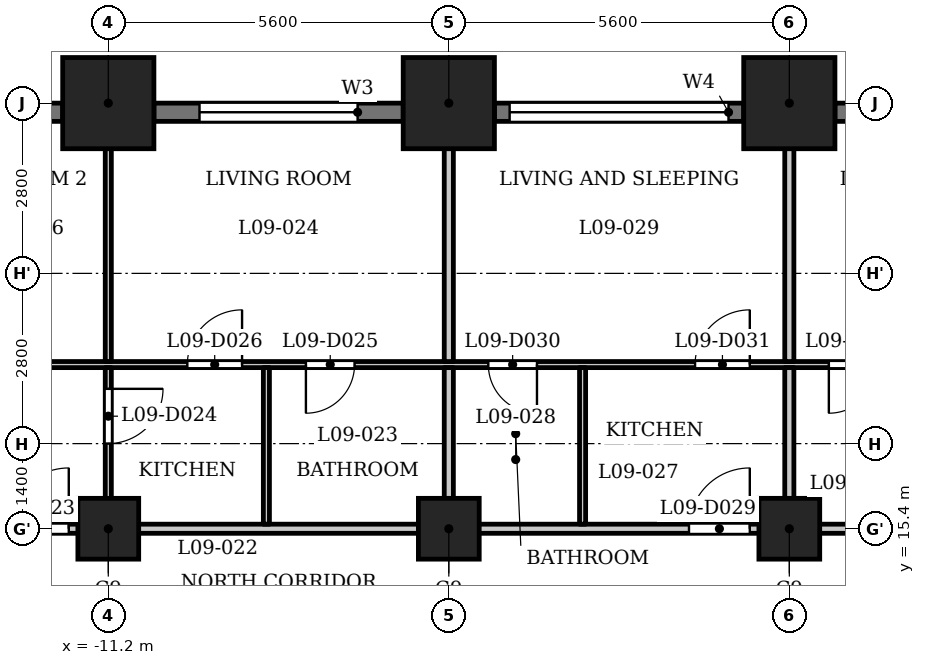
"""IFC4 building model, lengths in metres.
Left out: names, types, materials, properties, quantities, classifications, styles, units other than length and angle.
Written with IfcOpenShell. Run it as: python <this file> out.ifc"""

import sys

from ifc_helpers import new_model, si_unit, direction, frame, frame_2d, origin, origin_2d, place, context, subcontext, project, spatial, rectangle, extrude, element, fill, save


model = new_model("IFC4")
c1 = context("Model", 3, precision=1e-05, world=origin(), true_north=direction((0.0, 1.0)))
c2 = subcontext(c1, "Body", "Model", "MODEL_VIEW")
j1 = project(units=[si_unit("LENGTHUNIT", "METRE"), si_unit("PLANEANGLEUNIT", "RADIAN")], contexts=[c1])
p1 = place(None, origin())
s1 = spatial("IfcSite", under=j1, at=p1, CompositionType="ELEMENT")
p2 = place(p1, origin())
s2 = spatial("IfcBuilding", under=s1, at=p2, CompositionType="ELEMENT")
p3 = place(p2, frame((0.0, 0.0, 41.0)))
s3 = spatial("IfcBuildingStorey", under=s2, at=p3, CompositionType="ELEMENT", Elevation=41.0)
for number, where, z_axis, x_axis in (
    (1, (0.0, 22.4, 0.0), (0.0, 0.0, 1.0), (1.0, 0.0, 0.0)),
    (2, (-5.6, 22.4, 0.0), (0.0, 0.0, 1.0), (1.0, 0.0, 0.0)),
    (3, (-11.2, 22.4, 0.0), (0.0, 0.0, 1.0), (1.0, 0.0, 0.0)),
):
    element("IfcColumn", number, at=place(p3, frame(where, z_axis=z_axis, x_axis=x_axis)), inside=s3, PredefinedType="COLUMN", context=c2, shape_type="SweptSolid", body=[
        extrude(rectangle(XDim=1.5, YDim=1.5, at=origin_2d()), origin(), (0.0, 0.0, 1.0), 3.5),
    ])
for number, where, z_axis, x_axis in (
    (4, (-11.2, 15.4, 0.0), (0.0, 0.0, 1.0), (1.0, 0.0, 0.0)),
    (5, (-5.6, 15.4, 0.0), (0.0, 0.0, 1.0), (1.0, 0.0, 0.0)),
    (6, (0.0, 15.4, 0.0), (0.0, 0.0, 1.0), (1.0, 0.0, 0.0)),
):
    element("IfcColumn", number, at=place(p3, frame(where, z_axis=z_axis, x_axis=x_axis)), inside=s3, PredefinedType="COLUMN", context=c2, shape_type="SweptSolid", body=[
        extrude(rectangle(XDim=1.0, YDim=1.0, at=origin_2d()), origin(), (0.0, 0.0, 1.0), 3.5),
    ])
p4 = place(p3, frame((4.85, 22.25, 0.0), z_axis=(0.0, 0.0, 1.0), x_axis=(-1.0, 0.0, 0.0)))
e7 = element("IfcWall", 7, at=p4, inside=s3, PredefinedType="SOLIDWALL", context=c2, shape_type="SweptSolid", body=[
    extrude(rectangle(XDim=4.1, YDim=0.3, at=frame_2d((2.05, 0.0))), origin(), (0.0, 0.0, 1.0), 2.35),
])
p5 = place(p4, frame((0.25, 0.0, 1.2)))
e8 = element("IfcOpeningElement", 8, at=p5, cuts=e7, PredefinedType="OPENING", context=c2, shape_type="SweptSolid", body=[
    extrude(rectangle(XDim=3.6, YDim=0.95, at=frame_2d((1.8, 0.475))), frame((0.0, 0.16, 0.0), z_axis=(0.0, -1.0, 0.0), x_axis=(1.0, 0.0, 0.0)), (0.0, 0.0, 1.0), 0.32),
])
p6 = place(p3, frame((-0.75, 22.25, 0.0), z_axis=(0.0, 0.0, 1.0), x_axis=(-1.0, 0.0, 0.0)))
e9 = element("IfcWall", 9, at=p6, inside=s3, PredefinedType="SOLIDWALL", context=c2, shape_type="SweptSolid", body=[
    extrude(rectangle(XDim=4.1, YDim=0.3, at=frame_2d((2.05, 0.0))), origin(), (0.0, 0.0, 1.0), 2.35),
])
p7 = place(p6, frame((0.25, 0.0, 1.2)))
e10 = element("IfcOpeningElement", 10, at=p7, cuts=e9, PredefinedType="OPENING", context=c2, shape_type="SweptSolid", body=[
    extrude(rectangle(XDim=3.6, YDim=0.95, at=frame_2d((1.8, 0.475))), frame((0.0, 0.16, 0.0), z_axis=(0.0, -1.0, 0.0), x_axis=(1.0, 0.0, 0.0)), (0.0, 0.0, 1.0), 0.32),
])
p8 = place(p3, frame((-6.35, 22.25, 0.0), z_axis=(0.0, 0.0, 1.0), x_axis=(-1.0, 0.0, 0.0)))
e11 = element("IfcWall", 11, at=p8, inside=s3, PredefinedType="SOLIDWALL", context=c2, shape_type="SweptSolid", body=[
    extrude(rectangle(XDim=4.1, YDim=0.3, at=frame_2d((2.05, 0.0))), origin(), (0.0, 0.0, 1.0), 2.35),
])
p9 = place(p8, frame((0.75, 0.0, 0.9)))
e12 = element("IfcOpeningElement", 12, at=p9, cuts=e11, PredefinedType="OPENING", context=c2, shape_type="SweptSolid", body=[
    extrude(rectangle(XDim=2.6, YDim=1.25, at=frame_2d((1.3, 0.625))), frame((0.0, 0.16, 0.0), z_axis=(0.0, -1.0, 0.0), x_axis=(1.0, 0.0, 0.0)), (0.0, 0.0, 1.0), 0.32),
])
p10 = place(p3, frame((-11.95, 22.25, 0.0), z_axis=(0.0, 0.0, 1.0), x_axis=(-1.0, 0.0, 0.0)))
e13 = element("IfcWall", 13, at=p10, inside=s3, PredefinedType="SOLIDWALL", context=c2, shape_type="SweptSolid", body=[
    extrude(rectangle(XDim=4.1, YDim=0.3, at=frame_2d((2.05, 0.0))), origin(), (0.0, 0.0, 1.0), 2.35),
])
p11 = place(p10, frame((0.387, 0.0, 0.6)))
e14 = element("IfcOpeningElement", 14, at=p11, cuts=e13, PredefinedType="OPENING", context=c2, shape_type="SweptSolid", body=[
    extrude(rectangle(XDim=1.2, YDim=1.55, at=frame_2d((0.6, 0.775))), frame((0.0, 0.16, 0.0), z_axis=(0.0, -1.0, 0.0), x_axis=(1.0, 0.0, 0.0)), (0.0, 0.0, 1.0), 0.32),
])
p12 = place(p10, frame((2.512, 0.0, 0.6)))
e15 = element("IfcOpeningElement", 15, at=p12, cuts=e13, PredefinedType="OPENING", context=c2, shape_type="SweptSolid", body=[
    extrude(rectangle(XDim=1.2, YDim=1.55, at=frame_2d((0.6, 0.775))), frame((0.0, 0.16, 0.0), z_axis=(0.0, -1.0, 0.0), x_axis=(1.0, 0.0, 0.0)), (0.0, 0.0, 1.0), 0.32),
])
p13 = place(p3, frame((-27.484, 15.4, 0.0), z_axis=(0.0, 0.0, 1.0), x_axis=(1.0, 0.0, 0.0)))
e16 = element("IfcWall", 16, at=p13, inside=s3, PredefinedType="PARTITIONING", context=c2, shape_type="SweptSolid", body=[
    extrude(rectangle(XDim=54.968, YDim=0.15, at=frame_2d((27.484, 0.0))), origin(), (0.0, 0.0, 1.0), 3.2),
])
p14 = place(p13, frame((8.784, 0.0, 0.0)))
e17 = element("IfcOpeningElement", 17, at=p14, cuts=e16, PredefinedType="OPENING", context=c2, shape_type="SweptSolid", body=[
    extrude(rectangle(XDim=1.0, YDim=2.1, at=frame_2d((0.5, 1.05))), frame((0.0, 0.085, 0.0), z_axis=(0.0, -1.0, 0.0), x_axis=(1.0, 0.0, 0.0)), (0.0, 0.0, 1.0), 0.17),
])
p15 = place(p13, frame((14.634, 0.0, 0.0)))
e18 = element("IfcOpeningElement", 18, at=p15, cuts=e16, PredefinedType="OPENING", context=c2, shape_type="SweptSolid", body=[
    extrude(rectangle(XDim=1.0, YDim=2.1, at=frame_2d((0.5, 1.05))), frame((0.0, 0.085, 0.0), z_axis=(0.0, -1.0, 0.0), x_axis=(1.0, 0.0, 0.0)), (0.0, 0.0, 1.0), 0.17),
])
p16 = place(p13, frame((25.834, 0.0, 0.0)))
e19 = element("IfcOpeningElement", 19, at=p16, cuts=e16, PredefinedType="OPENING", context=c2, shape_type="SweptSolid", body=[
    extrude(rectangle(XDim=1.0, YDim=2.1, at=frame_2d((0.5, 1.05))), frame((0.0, 0.085, 0.0), z_axis=(0.0, -1.0, 0.0), x_axis=(1.0, 0.0, 0.0)), (0.0, 0.0, 1.0), 0.17),
])
p17 = place(p13, frame((30.184, 0.0, 0.0)))
e20 = element("IfcOpeningElement", 20, at=p17, cuts=e16, PredefinedType="OPENING", context=c2, shape_type="SweptSolid", body=[
    extrude(rectangle(XDim=1.0, YDim=2.1, at=frame_2d((0.5, 1.05))), frame((0.0, 0.085, 0.0), z_axis=(0.0, -1.0, 0.0), x_axis=(1.0, 0.0, 0.0)), (0.0, 0.0, 1.0), 0.17),
])
p18 = place(p13, frame((37.034, 0.0, 0.0)))
e21 = element("IfcOpeningElement", 21, at=p18, cuts=e16, PredefinedType="OPENING", context=c2, shape_type="SweptSolid", body=[
    extrude(rectangle(XDim=1.0, YDim=2.1, at=frame_2d((0.5, 1.05))), frame((0.0, 0.085, 0.0), z_axis=(0.0, -1.0, 0.0), x_axis=(1.0, 0.0, 0.0)), (0.0, 0.0, 1.0), 0.17),
])
p19 = place(p13, frame((48.234, 0.0, 0.0)))
e22 = element("IfcOpeningElement", 22, at=p19, cuts=e16, PredefinedType="OPENING", context=c2, shape_type="SweptSolid", body=[
    extrude(rectangle(XDim=1.0, YDim=2.1, at=frame_2d((0.5, 1.05))), frame((0.0, 0.085, 0.0), z_axis=(0.0, -1.0, 0.0), x_axis=(1.0, 0.0, 0.0)), (0.0, 0.0, 1.0), 0.17),
])
p20 = place(p3, frame((-26.44, 18.1, 0.0), z_axis=(0.0, 0.0, 1.0), x_axis=(1.0, 0.0, 0.0)))
e23 = element("IfcWall", 23, at=p20, inside=s3, PredefinedType="PARTITIONING", context=c2, shape_type="SweptSolid", body=[
    extrude(rectangle(XDim=52.63, YDim=0.1, at=frame_2d((26.315, 0.0))), origin(), (0.0, 0.0, 1.0), 3.2),
])
p21 = place(p20, frame((2.626, 0.0, 0.0)))
e24 = element("IfcOpeningElement", 24, at=p21, cuts=e23, PredefinedType="OPENING", context=c2, shape_type="SweptSolid", body=[
    extrude(rectangle(XDim=0.8, YDim=2.1, at=frame_2d((0.4, 1.05))), frame((0.0, 0.06, 0.0), z_axis=(0.0, -1.0, 0.0), x_axis=(1.0, 0.0, 0.0)), (0.0, 0.0, 1.0), 0.12),
])
p22 = place(p20, frame((7.84, 0.0, 0.0)))
e25 = element("IfcOpeningElement", 25, at=p22, cuts=e23, PredefinedType="OPENING", context=c2, shape_type="SweptSolid", body=[
    extrude(rectangle(XDim=0.9, YDim=2.1, at=frame_2d((0.45, 1.05))), frame((0.0, 0.06, 0.0), z_axis=(0.0, -1.0, 0.0), x_axis=(1.0, 0.0, 0.0)), (0.0, 0.0, 1.0), 0.12),
])
p23 = place(p20, frame((18.49, 0.0, 0.0)))
e26 = element("IfcOpeningElement", 26, at=p23, cuts=e23, PredefinedType="OPENING", context=c2, shape_type="SweptSolid", body=[
    extrude(rectangle(XDim=0.8, YDim=2.1, at=frame_2d((0.4, 1.05))), frame((0.0, 0.06, 0.0), z_axis=(0.0, -1.0, 0.0), x_axis=(1.0, 0.0, 0.0)), (0.0, 0.0, 1.0), 0.12),
])
p24 = place(p20, frame((16.54, 0.0, 0.0)))
e27 = element("IfcOpeningElement", 27, at=p24, cuts=e23, PredefinedType="OPENING", context=c2, shape_type="SweptSolid", body=[
    extrude(rectangle(XDim=0.9, YDim=2.1, at=frame_2d((0.45, 1.05))), frame((0.0, 0.06, 0.0), z_axis=(0.0, -1.0, 0.0), x_axis=(1.0, 0.0, 0.0)), (0.0, 0.0, 1.0), 0.12),
])
p25 = place(p20, frame((10.89, 0.0, 0.0)))
e28 = element("IfcOpeningElement", 28, at=p25, cuts=e23, PredefinedType="OPENING", context=c2, shape_type="SweptSolid", body=[
    extrude(rectangle(XDim=0.9, YDim=2.1, at=frame_2d((0.45, 1.05))), frame((0.0, 0.06, 0.0), z_axis=(0.0, -1.0, 0.0), x_axis=(1.0, 0.0, 0.0)), (0.0, 0.0, 1.0), 0.12),
])
p26 = place(p20, frame((12.94, 0.0, 0.0)))
e29 = element("IfcOpeningElement", 29, at=p26, cuts=e23, PredefinedType="OPENING", context=c2, shape_type="SweptSolid", body=[
    extrude(rectangle(XDim=0.9, YDim=2.1, at=frame_2d((0.45, 1.05))), frame((0.0, 0.06, 0.0), z_axis=(0.0, -1.0, 0.0), x_axis=(1.0, 0.0, 0.0)), (0.0, 0.0, 1.0), 0.12),
])
p27 = place(p20, frame((21.49, 0.0, 0.0)))
e30 = element("IfcOpeningElement", 30, at=p27, cuts=e23, PredefinedType="OPENING", context=c2, shape_type="SweptSolid", body=[
    extrude(rectangle(XDim=0.8, YDim=2.1, at=frame_2d((0.4, 1.05))), frame((0.0, 0.06, 0.0), z_axis=(0.0, -1.0, 0.0), x_axis=(1.0, 0.0, 0.0)), (0.0, 0.0, 1.0), 0.12),
])
p28 = place(p20, frame((24.89, 0.0, 0.0)))
e31 = element("IfcOpeningElement", 31, at=p28, cuts=e23, PredefinedType="OPENING", context=c2, shape_type="SweptSolid", body=[
    extrude(rectangle(XDim=0.9, YDim=2.1, at=frame_2d((0.45, 1.05))), frame((0.0, 0.06, 0.0), z_axis=(0.0, -1.0, 0.0), x_axis=(1.0, 0.0, 0.0)), (0.0, 0.0, 1.0), 0.12),
])
p29 = place(p20, frame((27.09, 0.0, 0.0)))
e32 = element("IfcOpeningElement", 32, at=p29, cuts=e23, PredefinedType="OPENING", context=c2, shape_type="SweptSolid", body=[
    extrude(rectangle(XDim=0.8, YDim=2.1, at=frame_2d((0.4, 1.05))), frame((0.0, 0.06, 0.0), z_axis=(0.0, -1.0, 0.0), x_axis=(1.0, 0.0, 0.0)), (0.0, 0.0, 1.0), 0.12),
])
p30 = place(p20, frame((28.99, 0.0, 0.0)))
e33 = element("IfcOpeningElement", 33, at=p30, cuts=e23, PredefinedType="OPENING", context=c2, shape_type="SweptSolid", body=[
    extrude(rectangle(XDim=0.9, YDim=2.1, at=frame_2d((0.45, 1.05))), frame((0.0, 0.06, 0.0), z_axis=(0.0, -1.0, 0.0), x_axis=(1.0, 0.0, 0.0)), (0.0, 0.0, 1.0), 0.12),
])
p31 = place(p20, frame((41.69, 0.0, 0.0)))
e34 = element("IfcOpeningElement", 34, at=p31, cuts=e23, PredefinedType="OPENING", context=c2, shape_type="SweptSolid", body=[
    extrude(rectangle(XDim=0.8, YDim=2.1, at=frame_2d((0.4, 1.05))), frame((0.0, 0.06, 0.0), z_axis=(0.0, -1.0, 0.0), x_axis=(1.0, 0.0, 0.0)), (0.0, 0.0, 1.0), 0.12),
])
p32 = place(p20, frame((38.99, 0.0, 0.0)))
e35 = element("IfcOpeningElement", 35, at=p32, cuts=e23, PredefinedType="OPENING", context=c2, shape_type="SweptSolid", body=[
    extrude(rectangle(XDim=0.9, YDim=2.1, at=frame_2d((0.45, 1.05))), frame((0.0, 0.06, 0.0), z_axis=(0.0, -1.0, 0.0), x_axis=(1.0, 0.0, 0.0)), (0.0, 0.0, 1.0), 0.12),
])
p33 = place(p20, frame((33.29, 0.0, 0.0)))
e36 = element("IfcOpeningElement", 36, at=p33, cuts=e23, PredefinedType="OPENING", context=c2, shape_type="SweptSolid", body=[
    extrude(rectangle(XDim=0.9, YDim=2.1, at=frame_2d((0.45, 1.05))), frame((0.0, 0.06, 0.0), z_axis=(0.0, -1.0, 0.0), x_axis=(1.0, 0.0, 0.0)), (0.0, 0.0, 1.0), 0.12),
])
p34 = place(p20, frame((35.34, 0.0, 0.0)))
e37 = element("IfcOpeningElement", 37, at=p34, cuts=e23, PredefinedType="OPENING", context=c2, shape_type="SweptSolid", body=[
    extrude(rectangle(XDim=0.9, YDim=2.1, at=frame_2d((0.45, 1.05))), frame((0.0, 0.06, 0.0), z_axis=(0.0, -1.0, 0.0), x_axis=(1.0, 0.0, 0.0)), (0.0, 0.0, 1.0), 0.12),
])
p35 = place(p20, frame((50.74, 0.0, 0.0)))
e38 = element("IfcOpeningElement", 38, at=p35, cuts=e23, PredefinedType="OPENING", context=c2, shape_type="SweptSolid", body=[
    extrude(rectangle(XDim=0.8, YDim=2.1, at=frame_2d((0.4, 1.05))), frame((0.0, 0.06, 0.0), z_axis=(0.0, -1.0, 0.0), x_axis=(1.0, 0.0, 0.0)), (0.0, 0.0, 1.0), 0.12),
])
p36 = place(p20, frame((47.29, 0.0, 0.0)))
e39 = element("IfcOpeningElement", 39, at=p36, cuts=e23, PredefinedType="OPENING", context=c2, shape_type="SweptSolid", body=[
    extrude(rectangle(XDim=0.9, YDim=2.1, at=frame_2d((0.45, 1.05))), frame((0.0, 0.06, 0.0), z_axis=(0.0, -1.0, 0.0), x_axis=(1.0, 0.0, 0.0)), (0.0, 0.0, 1.0), 0.12),
])
p37 = place(p3, frame((-11.2, 15.475, 0.0), z_axis=(0.0, 0.0, 1.0), x_axis=(0.0, 1.0, 0.0)))
e40 = element("IfcWall", 40, at=p37, inside=s3, PredefinedType="PARTITIONING", context=c2, shape_type="SweptSolid", body=[
    extrude(rectangle(XDim=2.575, YDim=0.1, at=frame_2d((1.288, 0.0))), origin(), (0.0, 0.0, 1.0), 3.2),
])
p38 = place(p37, frame((1.326, 0.0, 0.0)))
e41 = element("IfcOpeningElement", 41, at=p38, cuts=e40, PredefinedType="OPENING", context=c2, shape_type="SweptSolid", body=[
    extrude(rectangle(XDim=0.9, YDim=2.1, at=frame_2d((0.45, 1.05))), frame((0.0, 0.06, 0.0), z_axis=(0.0, -1.0, 0.0), x_axis=(1.0, 0.0, 0.0)), (0.0, 0.0, 1.0), 0.12),
])
p39 = place(p3, frame((-11.2, 18.15, 0.0), z_axis=(0.0, 0.0, 1.0), x_axis=(0.0, 1.0, 0.0)))
e42 = element("IfcWall", 42, at=p39, inside=s3, PredefinedType="PARTITIONING", context=c2, shape_type="SweptSolid", body=[
    extrude(rectangle(XDim=4.98, YDim=0.1, at=frame_2d((2.49, 0.0))), origin(), (0.0, 0.0, 1.0), 3.2),
])
p40 = place(p3, frame((-8.6, 15.475, 0.0), z_axis=(0.0, 0.0, 1.0), x_axis=(0.0, 1.0, 0.0)))
e43 = element("IfcWall", 43, at=p40, inside=s3, PredefinedType="PARTITIONING", context=c2, shape_type="SweptSolid", body=[
    extrude(rectangle(XDim=2.575, YDim=0.1, at=frame_2d((1.288, 0.0))), origin(), (0.0, 0.0, 1.0), 3.2),
])
p41 = place(p3, frame((-5.6, 15.475, 0.0), z_axis=(0.0, 0.0, 1.0), x_axis=(0.0, 1.0, 0.0)))
e44 = element("IfcWall", 44, at=p41, inside=s3, PredefinedType="PARTITIONING", context=c2, shape_type="SweptSolid", body=[
    extrude(rectangle(XDim=2.575, YDim=0.15, at=frame_2d((1.288, 0.0))), origin(), (0.0, 0.0, 1.0), 3.2),
])
p42 = place(p3, frame((-5.6, 18.15, 0.0), z_axis=(0.0, 0.0, 1.0), x_axis=(0.0, 1.0, 0.0)))
e45 = element("IfcWall", 45, at=p42, inside=s3, PredefinedType="PARTITIONING", context=c2, shape_type="SweptSolid", body=[
    extrude(rectangle(XDim=4.98, YDim=0.15, at=frame_2d((2.49, 0.0))), origin(), (0.0, 0.0, 1.0), 3.2),
])
p43 = place(p3, frame((-3.4, 15.475, 0.0), z_axis=(0.0, 0.0, 1.0), x_axis=(0.0, 1.0, 0.0)))
e46 = element("IfcWall", 46, at=p43, inside=s3, PredefinedType="PARTITIONING", context=c2, shape_type="SweptSolid", body=[
    extrude(rectangle(XDim=2.575, YDim=0.1, at=frame_2d((1.288, 0.0))), origin(), (0.0, 0.0, 1.0), 3.2),
])
p44 = place(p3, frame((0.0, 15.475, 0.0), z_axis=(0.0, 0.0, 1.0), x_axis=(0.0, 1.0, 0.0)))
e47 = element("IfcWall", 47, at=p44, inside=s3, PredefinedType="PARTITIONING", context=c2, shape_type="SweptSolid", body=[
    extrude(rectangle(XDim=2.575, YDim=0.15, at=frame_2d((1.288, 0.0))), origin(), (0.0, 0.0, 1.0), 3.2),
])
p45 = place(p3, frame((0.0, 18.15, 0.0), z_axis=(0.0, 0.0, 1.0), x_axis=(0.0, 1.0, 0.0)))
e48 = element("IfcWall", 48, at=p45, inside=s3, PredefinedType="PARTITIONING", context=c2, shape_type="SweptSolid", body=[
    extrude(rectangle(XDim=4.98, YDim=0.15, at=frame_2d((2.49, 0.0))), origin(), (0.0, 0.0, 1.0), 3.2),
])
p46 = place(p15, origin())
e49 = element("IfcDoor", 49, at=p46, inside=s3, OperationType="SINGLE_SWING_LEFT", PredefinedType="DOOR", context=c2, shape_type="SweptSolid", body=[
    extrude(rectangle(XDim=1.0, YDim=2.1, at=frame_2d((0.5, 1.05))), frame((0.0, 0.025, 0.0), z_axis=(0.0, -1.0, 0.0), x_axis=(1.0, 0.0, 0.0)), (0.0, 0.0, 1.0), 0.05),
])
fill(e18, e49)
p47 = place(p38, origin())
e50 = element("IfcDoor", 50, at=p47, inside=s3, OperationType="SINGLE_SWING_RIGHT", PredefinedType="DOOR", context=c2, shape_type="SweptSolid", body=[
    extrude(rectangle(XDim=0.9, YDim=2.1, at=frame_2d((0.45, 1.05))), frame((0.0, 0.025, 0.0), z_axis=(0.0, -1.0, 0.0), x_axis=(1.0, 0.0, 0.0)), (0.0, 0.0, 1.0), 0.05),
])
fill(e41, e50)
p48 = place(p23, origin())
e51 = element("IfcDoor", 51, at=p48, inside=s3, OperationType="SINGLE_SWING_LEFT", PredefinedType="DOOR", context=c2, shape_type="SweptSolid", body=[
    extrude(rectangle(XDim=0.8, YDim=2.1, at=frame_2d((0.4, 1.05))), frame((0.0, 0.025, 0.0), z_axis=(0.0, -1.0, 0.0), x_axis=(1.0, 0.0, 0.0)), (0.0, 0.0, 1.0), 0.05),
])
fill(e26, e51)
p49 = place(p24, origin())
e52 = element("IfcDoor", 52, at=p49, inside=s3, OperationType="SINGLE_SWING_LEFT", PredefinedType="DOOR", context=c2, shape_type="SweptSolid", body=[
    extrude(rectangle(XDim=0.9, YDim=2.1, at=frame_2d((0.45, 1.05))), frame((0.0, 0.025, 0.0), z_axis=(0.0, -1.0, 0.0), x_axis=(1.0, 0.0, 0.0)), (0.0, 0.0, 1.0), 0.05),
])
fill(e27, e52)
p50 = place(p16, origin())
e53 = element("IfcDoor", 53, at=p50, inside=s3, OperationType="SINGLE_SWING_LEFT", PredefinedType="DOOR", context=c2, shape_type="SweptSolid", body=[
    extrude(rectangle(XDim=1.0, YDim=2.1, at=frame_2d((0.5, 1.05))), frame((0.0, 0.025, 0.0), z_axis=(0.0, -1.0, 0.0), x_axis=(1.0, 0.0, 0.0)), (0.0, 0.0, 1.0), 0.05),
])
fill(e19, e53)
p51 = place(p27, origin())
e54 = element("IfcDoor", 54, at=p51, inside=s3, OperationType="SINGLE_SWING_RIGHT", PredefinedType="DOOR", context=c2, shape_type="SweptSolid", body=[
    extrude(rectangle(XDim=0.8, YDim=2.1, at=frame_2d((0.4, 1.05))), frame((0.0, 0.025, 0.0), z_axis=(0.0, -1.0, 0.0), x_axis=(1.0, 0.0, 0.0)), (0.0, 0.0, 1.0), 0.05),
])
fill(e30, e54)
p52 = place(p28, origin())
e55 = element("IfcDoor", 55, at=p52, inside=s3, OperationType="SINGLE_SWING_LEFT", PredefinedType="DOOR", context=c2, shape_type="SweptSolid", body=[
    extrude(rectangle(XDim=0.9, YDim=2.1, at=frame_2d((0.45, 1.05))), frame((0.0, 0.025, 0.0), z_axis=(0.0, -1.0, 0.0), x_axis=(1.0, 0.0, 0.0)), (0.0, 0.0, 1.0), 0.05),
])
fill(e31, e55)
p53 = place(p29, origin())
e56 = element("IfcDoor", 56, at=p53, inside=s3, OperationType="SINGLE_SWING_LEFT", PredefinedType="DOOR", context=c2, shape_type="SweptSolid", body=[
    extrude(rectangle(XDim=0.8, YDim=2.1, at=frame_2d((0.4, 1.05))), frame((0.0, 0.025, 0.0), z_axis=(0.0, -1.0, 0.0), x_axis=(1.0, 0.0, 0.0)), (0.0, 0.0, 1.0), 0.05),
])
fill(e32, e56)
p54 = place(p7, origin())
e57 = element("IfcWindow", 57, at=p54, inside=s3, PartitioningType="SINGLE_PANEL", PredefinedType="WINDOW", context=c2, shape_type="SweptSolid", body=[
    extrude(rectangle(XDim=3.6, YDim=0.95, at=frame_2d((1.8, 0.475))), frame((0.0, 0.03, 0.0), z_axis=(0.0, -1.0, 0.0), x_axis=(1.0, 0.0, 0.0)), (0.0, 0.0, 1.0), 0.06),
])
fill(e10, e57)
p55 = place(p9, origin())
e58 = element("IfcWindow", 58, at=p55, inside=s3, PartitioningType="SINGLE_PANEL", PredefinedType="WINDOW", context=c2, shape_type="SweptSolid", body=[
    extrude(rectangle(XDim=2.6, YDim=1.25, at=frame_2d((1.3, 0.625))), frame((0.0, 0.03, 0.0), z_axis=(0.0, -1.0, 0.0), x_axis=(1.0, 0.0, 0.0)), (0.0, 0.0, 1.0), 0.06),
])
fill(e12, e58)
save(model, sys.argv[1])
